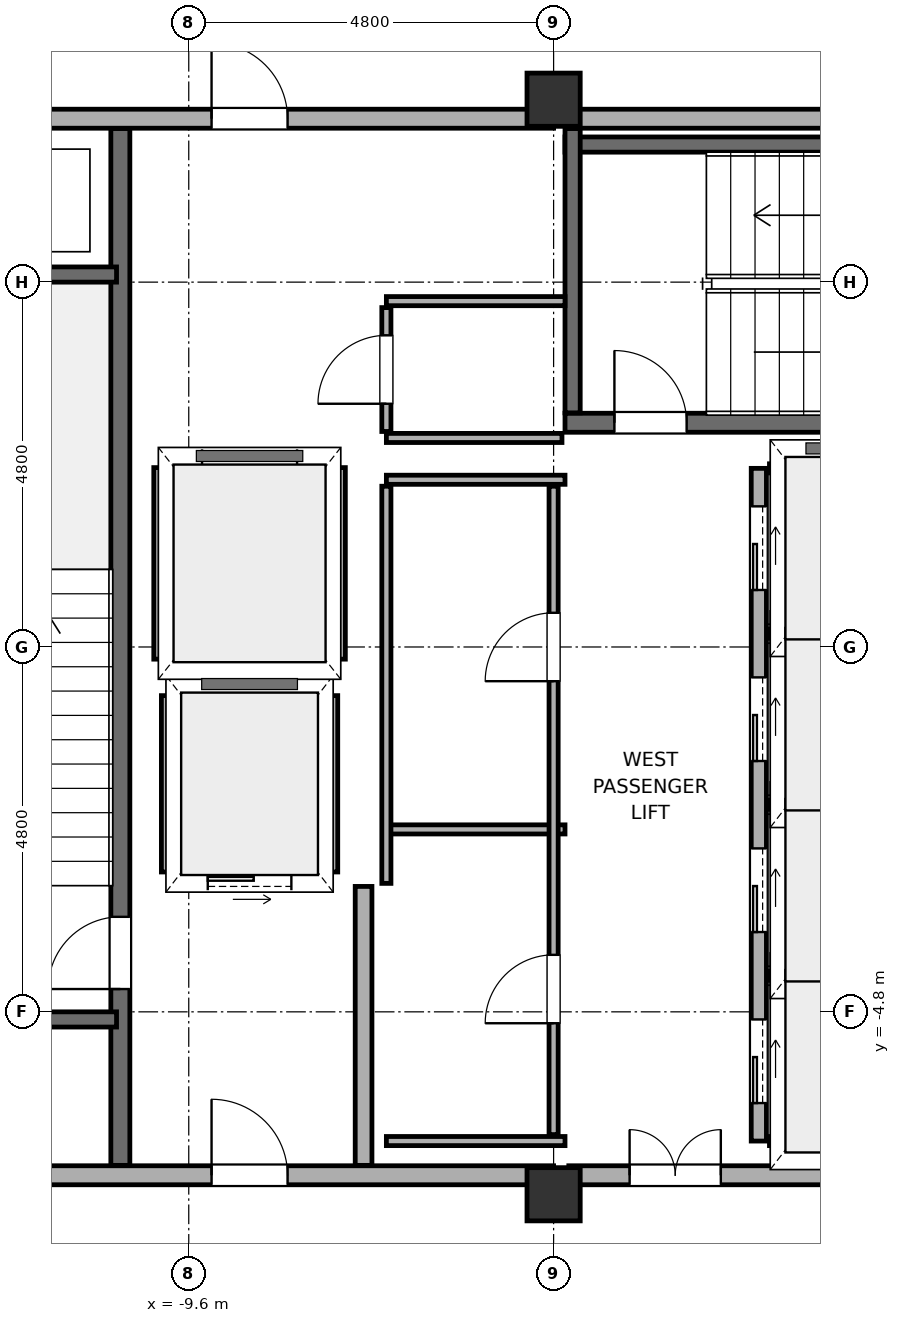
"""IFC4 building model, lengths in metres.
Left out: names, types, materials, properties, quantities, classifications, styles, units other than length and angle.
Written with IfcOpenShell. Run it as: python <this file> out.ifc"""

import sys

from ifc_helpers import new_model, si_unit, direction, frame, frame_2d, origin, origin_2d, place, context, subcontext, project, spatial, rectangle, hollow_rectangle, extrude, element, fill, save


model = new_model("IFC4")
c1 = context("Model", 3, precision=1e-05, world=origin(), true_north=direction((0.0, 1.0)))
c2 = subcontext(c1, "Body", "Model", "MODEL_VIEW")
j1 = project(units=[si_unit("LENGTHUNIT", "METRE"), si_unit("PLANEANGLEUNIT", "RADIAN")], contexts=[c1])
p1 = place(None, origin())
s1 = spatial("IfcSite", under=j1, at=p1, CompositionType="ELEMENT")
p2 = place(p1, origin())
s2 = spatial("IfcBuilding", under=s1, at=p2, CompositionType="ELEMENT")
p3 = place(p2, frame((0.0, 0.0, 180.3)))
s3 = spatial("IfcBuildingStorey", under=s2, at=p3, CompositionType="ELEMENT", Elevation=180.3)
for number, where, z_axis, x_axis in (
    (1, (-4.8, -7.2, 0.0), (0.0, 0.0, 1.0), (1.0, 0.0, 0.0)),
    (2, (-4.8, 7.2, 0.0), (0.0, 0.0, 1.0), (1.0, 0.0, 0.0)),
):
    element("IfcColumn", number, at=place(p3, frame(where, z_axis=z_axis, x_axis=x_axis)), inside=s3, PredefinedType="COLUMN", context=c2, shape_type="SweptSolid", body=[
        extrude(hollow_rectangle(XDim=0.7, YDim=0.7, WallThickness=0.032, at=origin_2d()), origin(), (0.0, 0.0, 1.0), 5.2),
    ])
p4 = place(p3, frame((-14.2, -6.95, 0.0), z_axis=(0.0, 0.0, 1.0), x_axis=(1.0, 0.0, 0.0)))
e3 = element("IfcWall", 3, at=p4, inside=s3, PredefinedType="SOLIDWALL", context=c2, shape_type="SweptSolid", body=[
    extrude(rectangle(XDim=9.4, YDim=0.25, at=frame_2d((4.7, 0.0))), origin(), (0.0, 0.0, 1.0), 3.55),
])
p5 = place(p4, frame((4.9, 0.0, 0.0)))
e4 = element("IfcOpeningElement", 4, at=p5, cuts=e3, PredefinedType="OPENING", context=c2, shape_type="SweptSolid", body=[
    extrude(rectangle(XDim=1.0, YDim=2.15, at=frame_2d((0.5, 1.075))), frame((0.0, 0.14, 0.0), z_axis=(0.0, -1.0, 0.0), x_axis=(1.0, 0.0, 0.0)), (0.0, 0.0, 1.0), 0.28),
])
p6 = place(p3, frame((-4.6, -6.95, 0.0), z_axis=(0.0, 0.0, 1.0), x_axis=(1.0, 0.0, 0.0)))
e5 = element("IfcWall", 5, at=p6, inside=s3, PredefinedType="SOLIDWALL", context=c2, shape_type="SweptSolid", body=[
    extrude(rectangle(XDim=9.2, YDim=0.25, at=frame_2d((4.6, 0.0))), origin(), (0.0, 0.0, 1.0), 3.75),
])
p7 = place(p6, frame((0.8, 0.0, 0.0)))
e6 = element("IfcOpeningElement", 6, at=p7, cuts=e5, PredefinedType="OPENING", context=c2, shape_type="SweptSolid", body=[
    extrude(rectangle(XDim=1.2, YDim=2.2, at=frame_2d((0.6, 1.1))), frame((0.0, 0.14, 0.0), z_axis=(0.0, -1.0, 0.0), x_axis=(1.0, 0.0, 0.0)), (0.0, 0.0, 1.0), 0.28),
])
p8 = place(p6, frame((5.55, 0.0, 0.0)))
e7 = element("IfcOpeningElement", 7, at=p8, cuts=e5, PredefinedType="OPENING", context=c2, shape_type="SweptSolid", body=[
    extrude(rectangle(XDim=1.2, YDim=2.2, at=frame_2d((0.6, 1.1))), frame((0.0, 0.14, 0.0), z_axis=(0.0, -1.0, 0.0), x_axis=(1.0, 0.0, 0.0)), (0.0, 0.0, 1.0), 0.28),
])
p9 = place(p3, frame((-14.2, 6.95, 0.0), z_axis=(0.0, 0.0, 1.0), x_axis=(1.0, 0.0, 0.0)))
e8 = element("IfcWall", 8, at=p9, inside=s3, PredefinedType="SOLIDWALL", context=c2, shape_type="SweptSolid", body=[
    extrude(rectangle(XDim=9.4, YDim=0.25, at=frame_2d((4.7, 0.0))), origin(), (0.0, 0.0, 1.0), 3.55),
])
p10 = place(p9, frame((4.9, 0.0, 0.0)))
e9 = element("IfcOpeningElement", 9, at=p10, cuts=e8, PredefinedType="OPENING", context=c2, shape_type="SweptSolid", body=[
    extrude(rectangle(XDim=1.0, YDim=2.15, at=frame_2d((0.5, 1.075))), frame((0.0, 0.14, 0.0), z_axis=(0.0, -1.0, 0.0), x_axis=(1.0, 0.0, 0.0)), (0.0, 0.0, 1.0), 0.28),
])
p11 = place(p3, frame((-4.6, 6.95, 0.0), z_axis=(0.0, 0.0, 1.0), x_axis=(1.0, 0.0, 0.0)))
e10 = element("IfcWall", 10, at=p11, inside=s3, PredefinedType="SOLIDWALL", context=c2, shape_type="SweptSolid", body=[
    extrude(rectangle(XDim=9.2, YDim=0.25, at=frame_2d((4.6, 0.0))), origin(), (0.0, 0.0, 1.0), 3.55),
])
p12 = place(p3, frame((-7.3, -6.82, 0.0), z_axis=(0.0, 0.0, 1.0), x_axis=(0.0, 1.0, 0.0)))
e11 = element("IfcWall", 11, at=p12, inside=s3, PredefinedType="SOLIDWALL", context=c2, shape_type="SweptSolid", body=[
    extrude(rectangle(XDim=3.67, YDim=0.22, at=frame_2d((1.835, 0.0))), origin(), (0.0, 0.0, 1.0), 3.55),
])
p13 = place(p3, frame((-10.5, -6.82, -0.22), z_axis=(0.0, 0.0, 1.0), x_axis=(0.0, 1.0, 0.0)))
e12 = element("IfcWall", 12, at=p13, inside=s3, PredefinedType="SOLIDWALL", context=c2, shape_type="SweptSolid", body=[
    extrude(rectangle(XDim=13.64, YDim=0.25, at=frame_2d((6.82, 0.0))), origin(), (0.0, 0.0, 1.0), 5.17),
])
p14 = place(p13, frame((2.32, 0.0, 0.22)))
e13 = element("IfcOpeningElement", 13, at=p14, cuts=e12, PredefinedType="OPENING", context=c2, shape_type="SweptSolid", body=[
    extrude(rectangle(XDim=0.95, YDim=2.15, at=frame_2d((0.475, 1.075))), frame((0.0, 0.14, 0.0), z_axis=(0.0, -1.0, 0.0), x_axis=(1.0, 0.0, 0.0)), (0.0, 0.0, 1.0), 0.28),
])
for number, where, z_axis, x_axis in (
    (14, (-14.2, -4.9, -0.22), (0.0, 0.0, 1.0), (1.0, 0.0, 0.0)),
    (15, (-14.2, 4.9, -0.22), (0.0, 0.0, 1.0), (1.0, 0.0, 0.0)),
):
    element("IfcWall", number, at=place(p3, frame(where, z_axis=z_axis, x_axis=x_axis)), inside=s3, PredefinedType="SOLIDWALL", context=c2, shape_type="SweptSolid", body=[
        extrude(rectangle(XDim=3.65, YDim=0.2, at=frame_2d((1.825, 0.0))), origin(), (0.0, 0.0, 1.0), 5.17),
    ])
p15 = place(p3, frame((-4.65, 2.95, -0.22), z_axis=(0.0, 0.0, 1.0), x_axis=(1.0, 0.0, 0.0)))
e16 = element("IfcWall", 16, at=p15, inside=s3, PredefinedType="SOLIDWALL", context=c2, shape_type="SweptSolid", body=[
    extrude(rectangle(XDim=9.9, YDim=0.25, at=frame_2d((4.95, 0.0))), origin(), (0.0, 0.0, 1.0), 5.17),
])
p16 = place(p15, frame((0.65, 0.0, 0.22)))
e17 = element("IfcOpeningElement", 17, at=p16, cuts=e16, PredefinedType="OPENING", context=c2, shape_type="SweptSolid", body=[
    extrude(rectangle(XDim=0.95, YDim=2.15, at=frame_2d((0.475, 1.075))), frame((0.0, 0.14, 0.0), z_axis=(0.0, -1.0, 0.0), x_axis=(1.0, 0.0, 0.0)), (0.0, 0.0, 1.0), 0.28),
])
p17 = place(p3, frame((-4.65, 6.61, -0.22), z_axis=(0.0, 0.0, 1.0), x_axis=(1.0, 0.0, 0.0)))
e18 = element("IfcWall", 18, at=p17, inside=s3, PredefinedType="SOLIDWALL", context=c2, shape_type="SweptSolid", body=[
    extrude(rectangle(XDim=9.9, YDim=0.2, at=frame_2d((4.95, 0.0))), origin(), (0.0, 0.0, 1.0), 5.17),
])
p18 = place(p3, frame((-4.55, 3.08, -0.22), z_axis=(0.0, 0.0, 1.0), x_axis=(0.0, 1.0, 0.0)))
e19 = element("IfcWall", 19, at=p18, inside=s3, PredefinedType="SOLIDWALL", context=c2, shape_type="SweptSolid", body=[
    extrude(rectangle(XDim=3.74, YDim=0.2, at=frame_2d((1.87, 0.0))), origin(), (0.0, 0.0, 1.0), 5.17),
])
p19 = place(p3, frame((-2.1, -6.5, 0.0), z_axis=(0.0, 0.0, 1.0), x_axis=(0.0, 1.0, 0.0)))
e20 = element("IfcWall", 20, at=p19, inside=s3, PredefinedType="SOLIDWALL", context=c2, shape_type="SweptSolid", body=[
    extrude(rectangle(XDim=8.85, YDim=0.2, at=frame_2d((4.425, 0.0))), origin(), (0.0, 0.0, 1.0), 4.95),
])
p20 = place(p19, frame((0.5, 0.0, 0.0)))
e21 = element("IfcOpeningElement", 21, at=p20, cuts=e20, PredefinedType="OPENING", context=c2, shape_type="SweptSolid", body=[
    extrude(rectangle(XDim=1.1, YDim=2.2, at=frame_2d((0.55, 1.1))), frame((0.0, 0.115, 0.0), z_axis=(0.0, -1.0, 0.0), x_axis=(1.0, 0.0, 0.0)), (0.0, 0.0, 1.0), 0.23),
])
p21 = place(p19, frame((2.75, 0.0, 0.0)))
e22 = element("IfcOpeningElement", 22, at=p21, cuts=e20, PredefinedType="OPENING", context=c2, shape_type="SweptSolid", body=[
    extrude(rectangle(XDim=1.1, YDim=2.2, at=frame_2d((0.55, 1.1))), frame((0.0, 0.115, 0.0), z_axis=(0.0, -1.0, 0.0), x_axis=(1.0, 0.0, 0.0)), (0.0, 0.0, 1.0), 0.23),
])
p22 = place(p19, frame((5.0, 0.0, 0.0)))
e23 = element("IfcOpeningElement", 23, at=p22, cuts=e20, PredefinedType="OPENING", context=c2, shape_type="SweptSolid", body=[
    extrude(rectangle(XDim=1.1, YDim=2.2, at=frame_2d((0.55, 1.1))), frame((0.0, 0.115, 0.0), z_axis=(0.0, -1.0, 0.0), x_axis=(1.0, 0.0, 0.0)), (0.0, 0.0, 1.0), 0.23),
])
p23 = place(p19, frame((7.25, 0.0, 0.0)))
e24 = element("IfcOpeningElement", 24, at=p23, cuts=e20, PredefinedType="OPENING", context=c2, shape_type="SweptSolid", body=[
    extrude(rectangle(XDim=1.1, YDim=2.2, at=frame_2d((0.55, 1.1))), frame((0.0, 0.115, 0.0), z_axis=(0.0, -1.0, 0.0), x_axis=(1.0, 0.0, 0.0)), (0.0, 0.0, 1.0), 0.23),
])
for number, where, z_axis, x_axis in (
    (25, (-1.96, -6.5, 0.0), (0.0, 0.0, 1.0), (1.0, 0.0, 0.0)),
    (26, (-1.96, -4.325, 0.0), (0.0, 0.0, 1.0), (1.0, 0.0, 0.0)),
    (27, (-1.96, -2.075, 0.0), (0.0, 0.0, 1.0), (1.0, 0.0, 0.0)),
    (28, (-1.96, 0.175, 0.0), (0.0, 0.0, 1.0), (1.0, 0.0, 0.0)),
    (29, (-1.96, 2.35, 0.0), (0.0, 0.0, 1.0), (1.0, 0.0, 0.0)),
):
    element("IfcWall", number, at=place(p3, frame(where, z_axis=z_axis, x_axis=x_axis)), inside=s3, PredefinedType="PARTITIONING", context=c2, shape_type="SweptSolid", body=[
        extrude(rectangle(XDim=2.22, YDim=0.12, at=frame_2d((1.11, 0.0))), origin(), (0.0, 0.0, 1.0), 4.95),
    ])
p24 = place(p3, frame((-9.82, -3.1, 0.0), z_axis=(0.0, 0.0, 1.0), x_axis=(1.0, 0.0, 0.0)))
e30 = element("IfcWall", 30, at=p24, inside=s3, PredefinedType="SOLIDWALL", context=c2, shape_type="SweptSolid", body=[
    extrude(rectangle(XDim=2.04, YDim=0.2, at=frame_2d((1.02, 0.0))), origin(), (0.0, 0.0, 1.0), 4.95),
])
p25 = place(p24, frame((0.47, 0.0, 0.0)))
e31 = element("IfcOpeningElement", 31, at=p25, cuts=e30, PredefinedType="OPENING", context=c2, shape_type="SweptSolid", body=[
    extrude(rectangle(XDim=1.1, YDim=2.2, at=frame_2d((0.55, 1.1))), frame((0.0, 0.115, 0.0), z_axis=(0.0, -1.0, 0.0), x_axis=(1.0, 0.0, 0.0)), (0.0, 0.0, 1.0), 0.23),
])
p26 = place(p3, frame((-9.82, -0.5, 0.0), z_axis=(0.0, 0.0, 1.0), x_axis=(1.0, 0.0, 0.0)))
e32 = element("IfcWall", 32, at=p26, inside=s3, PredefinedType="SOLIDWALL", context=c2, shape_type="SweptSolid", body=[
    extrude(rectangle(XDim=2.04, YDim=0.2, at=frame_2d((1.02, 0.0))), origin(), (0.0, 0.0, 1.0), 4.95),
])
for number, where, z_axis, x_axis in (
    (33, (-9.9, -2.96, 0.0), (0.0, 0.0, 1.0), (0.0, 1.0, 0.0)),
    (34, (-7.7, -2.96, 0.0), (0.0, 0.0, 1.0), (0.0, 1.0, 0.0)),
):
    element("IfcWall", number, at=place(p3, frame(where, z_axis=z_axis, x_axis=x_axis)), inside=s3, PredefinedType="PARTITIONING", context=c2, shape_type="SweptSolid", body=[
        extrude(rectangle(XDim=2.32, YDim=0.12, at=frame_2d((1.16, 0.0))), origin(), (0.0, 0.0, 1.0), 4.95),
    ])
p27 = place(p3, frame((-9.92, 2.5, 0.0), z_axis=(0.0, 0.0, 1.0), x_axis=(1.0, 0.0, 0.0)))
e35 = element("IfcWall", 35, at=p27, inside=s3, PredefinedType="SOLIDWALL", context=c2, shape_type="SweptSolid", body=[
    extrude(rectangle(XDim=2.24, YDim=0.2, at=frame_2d((1.12, 0.0))), origin(), (0.0, 0.0, 1.0), 4.95),
])
p28 = place(p27, frame((0.495, 0.0, 0.0)))
e36 = element("IfcOpeningElement", 36, at=p28, cuts=e35, PredefinedType="OPENING", context=c2, shape_type="SweptSolid", body=[
    extrude(rectangle(XDim=1.25, YDim=2.25, at=frame_2d((0.625, 1.125))), frame((0.0, 0.115, 0.0), z_axis=(0.0, -1.0, 0.0), x_axis=(1.0, 0.0, 0.0)), (0.0, 0.0, 1.0), 0.23),
])
p29 = place(p3, frame((-9.92, -0.3, 0.0), z_axis=(0.0, 0.0, 1.0), x_axis=(1.0, 0.0, 0.0)))
e37 = element("IfcWall", 37, at=p29, inside=s3, PredefinedType="SOLIDWALL", context=c2, shape_type="SweptSolid", body=[
    extrude(rectangle(XDim=2.24, YDim=0.2, at=frame_2d((1.12, 0.0))), origin(), (0.0, 0.0, 1.0), 4.95),
])
for number, where, z_axis, x_axis in (
    (38, (-10.0, -0.16, 0.0), (0.0, 0.0, 1.0), (0.0, 1.0, 0.0)),
    (39, (-7.6, -0.16, 0.0), (0.0, 0.0, 1.0), (0.0, 1.0, 0.0)),
):
    element("IfcWall", number, at=place(p3, frame(where, z_axis=z_axis, x_axis=x_axis)), inside=s3, PredefinedType="PARTITIONING", context=c2, shape_type="SweptSolid", body=[
        extrude(rectangle(XDim=2.52, YDim=0.12, at=frame_2d((1.26, 0.0))), origin(), (0.0, 0.0, 1.0), 4.95),
    ])
for number, where, z_axis, x_axis in (
    (40, (-7.0, -6.5, 0.0), (0.0, 0.0, 1.0), (1.0, 0.0, 0.0)),
    (41, (-7.0, -2.4, 0.0), (0.0, 0.0, 1.0), (1.0, 0.0, 0.0)),
    (42, (-7.0, 2.2, 0.0), (0.0, 0.0, 1.0), (1.0, 0.0, 0.0)),
):
    element("IfcWall", number, at=place(p3, frame(where, z_axis=z_axis, x_axis=x_axis)), inside=s3, PredefinedType="PARTITIONING", context=c2, shape_type="SweptSolid", body=[
        extrude(rectangle(XDim=2.35, YDim=0.12, at=frame_2d((1.175, 0.0))), origin(), (0.0, 0.0, 1.0), 4.95),
    ])
p30 = place(p3, frame((-7.0, 2.75, 0.0), z_axis=(0.0, 0.0, 1.0), x_axis=(1.0, 0.0, 0.0)))
e43 = element("IfcWall", 43, at=p30, inside=s3, PredefinedType="PARTITIONING", context=c2, shape_type="SweptSolid", body=[
    extrude(rectangle(XDim=2.31, YDim=0.12, at=frame_2d((1.155, 0.0))), origin(), (0.0, 0.0, 1.0), 4.95),
])
p31 = place(p3, frame((-7.0, 4.55, 0.0), z_axis=(0.0, 0.0, 1.0), x_axis=(1.0, 0.0, 0.0)))
e44 = element("IfcWall", 44, at=p31, inside=s3, PredefinedType="PARTITIONING", context=c2, shape_type="SweptSolid", body=[
    extrude(rectangle(XDim=2.35, YDim=0.12, at=frame_2d((1.175, 0.0))), origin(), (0.0, 0.0, 1.0), 4.95),
])
p32 = place(p3, frame((-7.0, -3.11, 0.0), z_axis=(0.0, 0.0, 1.0), x_axis=(0.0, 1.0, 0.0)))
e45 = element("IfcWall", 45, at=p32, inside=s3, PredefinedType="PARTITIONING", context=c2, shape_type="SweptSolid", body=[
    extrude(rectangle(XDim=5.225, YDim=0.12, at=frame_2d((2.613, 0.0))), origin(), (0.0, 0.0, 1.0), 4.95),
])
p33 = place(p3, frame((-7.0, 2.835, 0.0), z_axis=(0.0, 0.0, 1.0), x_axis=(0.0, 1.0, 0.0)))
e46 = element("IfcWall", 46, at=p33, inside=s3, PredefinedType="PARTITIONING", context=c2, shape_type="SweptSolid", body=[
    extrude(rectangle(XDim=1.63, YDim=0.12, at=frame_2d((0.815, 0.0))), origin(), (0.0, 0.0, 1.0), 4.95),
])
p34 = place(p33, frame((0.365, 0.0, 0.0)))
e47 = element("IfcOpeningElement", 47, at=p34, cuts=e46, PredefinedType="OPENING", context=c2, shape_type="SweptSolid", body=[
    extrude(rectangle(XDim=0.9, YDim=2.1, at=frame_2d((0.45, 1.05))), frame((0.0, 0.075, 0.0), z_axis=(0.0, -1.0, 0.0), x_axis=(1.0, 0.0, 0.0)), (0.0, 0.0, 1.0), 0.15),
])
p35 = place(p3, frame((-4.8, -6.415, 0.0), z_axis=(0.0, 0.0, 1.0), x_axis=(0.0, 1.0, 0.0)))
e48 = element("IfcWall", 48, at=p35, inside=s3, PredefinedType="PARTITIONING", context=c2, shape_type="SweptSolid", body=[
    extrude(rectangle(XDim=8.53, YDim=0.12, at=frame_2d((4.265, 0.0))), origin(), (0.0, 0.0, 1.0), 4.95),
])
p36 = place(p35, frame((1.465, 0.0, 0.0)))
e49 = element("IfcOpeningElement", 49, at=p36, cuts=e48, PredefinedType="OPENING", context=c2, shape_type="SweptSolid", body=[
    extrude(rectangle(XDim=0.9, YDim=2.1, at=frame_2d((0.45, 1.05))), frame((0.0, 0.075, 0.0), z_axis=(0.0, -1.0, 0.0), x_axis=(1.0, 0.0, 0.0)), (0.0, 0.0, 1.0), 0.15),
])
p37 = place(p35, frame((5.965, 0.0, 0.0)))
e50 = element("IfcOpeningElement", 50, at=p37, cuts=e48, PredefinedType="OPENING", context=c2, shape_type="SweptSolid", body=[
    extrude(rectangle(XDim=0.9, YDim=2.1, at=frame_2d((0.45, 1.05))), frame((0.0, 0.075, 0.0), z_axis=(0.0, -1.0, 0.0), x_axis=(1.0, 0.0, 0.0)), (0.0, 0.0, 1.0), 0.15),
])
p38 = place(p5, origin())
e51 = element("IfcDoor", 51, at=p38, inside=s3, OperationType="SINGLE_SWING_LEFT", PredefinedType="DOOR", context=c2, shape_type="SweptSolid", body=[
    extrude(rectangle(XDim=1.0, YDim=2.15, at=frame_2d((0.5, 1.075))), frame((0.0, 0.025, 0.0), z_axis=(0.0, -1.0, 0.0), x_axis=(1.0, 0.0, 0.0)), (0.0, 0.0, 1.0), 0.05),
])
fill(e4, e51)
p39 = place(p7, origin())
e52 = element("IfcDoor", 52, at=p39, inside=s3, OperationType="DOUBLE_DOOR_SINGLE_SWING", PredefinedType="DOOR", context=c2, shape_type="SweptSolid", body=[
    extrude(rectangle(XDim=1.2, YDim=2.2, at=frame_2d((0.6, 1.1))), frame((0.0, 0.025, 0.0), z_axis=(0.0, -1.0, 0.0), x_axis=(1.0, 0.0, 0.0)), (0.0, 0.0, 1.0), 0.05),
])
fill(e6, e52)
p40 = place(p10, origin())
e53 = element("IfcDoor", 53, at=p40, inside=s3, OperationType="SINGLE_SWING_RIGHT", PredefinedType="DOOR", context=c2, shape_type="SweptSolid", body=[
    extrude(rectangle(XDim=1.0, YDim=2.15, at=frame_2d((0.5, 1.075))), frame((0.0, 0.025, 0.0), z_axis=(0.0, -1.0, 0.0), x_axis=(1.0, 0.0, 0.0)), (0.0, 0.0, 1.0), 0.05),
])
fill(e9, e53)
p41 = place(p14, origin())
e54 = element("IfcDoor", 54, at=p41, inside=s3, OperationType="SINGLE_SWING_RIGHT", PredefinedType="DOOR", context=c2, shape_type="SweptSolid", body=[
    extrude(rectangle(XDim=0.95, YDim=2.15, at=frame_2d((0.475, 1.075))), frame((0.0, 0.025, 0.0), z_axis=(0.0, -1.0, 0.0), x_axis=(1.0, 0.0, 0.0)), (0.0, 0.0, 1.0), 0.05),
])
fill(e13, e54)
p42 = place(p16, origin())
e55 = element("IfcDoor", 55, at=p42, inside=s3, OperationType="SINGLE_SWING_RIGHT", PredefinedType="DOOR", context=c2, shape_type="SweptSolid", body=[
    extrude(rectangle(XDim=0.95, YDim=2.15, at=frame_2d((0.475, 1.075))), frame((0.0, 0.025, 0.0), z_axis=(0.0, -1.0, 0.0), x_axis=(1.0, 0.0, 0.0)), (0.0, 0.0, 1.0), 0.05),
])
fill(e17, e55)
p43 = place(p20, origin())
e56 = element("IfcDoor", 56, at=p43, inside=s3, OperationType="SLIDING_TO_LEFT", PredefinedType="DOOR", context=c2, shape_type="SweptSolid", body=[
    extrude(rectangle(XDim=1.1, YDim=2.2, at=frame_2d((0.55, 1.1))), frame((0.0, 0.025, 0.0), z_axis=(0.0, -1.0, 0.0), x_axis=(1.0, 0.0, 0.0)), (0.0, 0.0, 1.0), 0.05),
])
fill(e21, e56)
p44 = place(p21, origin())
e57 = element("IfcDoor", 57, at=p44, inside=s3, OperationType="SLIDING_TO_LEFT", PredefinedType="DOOR", context=c2, shape_type="SweptSolid", body=[
    extrude(rectangle(XDim=1.1, YDim=2.2, at=frame_2d((0.55, 1.1))), frame((0.0, 0.025, 0.0), z_axis=(0.0, -1.0, 0.0), x_axis=(1.0, 0.0, 0.0)), (0.0, 0.0, 1.0), 0.05),
])
fill(e22, e57)
p45 = place(p22, origin())
e58 = element("IfcDoor", 58, at=p45, inside=s3, OperationType="SLIDING_TO_LEFT", PredefinedType="DOOR", context=c2, shape_type="SweptSolid", body=[
    extrude(rectangle(XDim=1.1, YDim=2.2, at=frame_2d((0.55, 1.1))), frame((0.0, 0.025, 0.0), z_axis=(0.0, -1.0, 0.0), x_axis=(1.0, 0.0, 0.0)), (0.0, 0.0, 1.0), 0.05),
])
fill(e23, e58)
p46 = place(p23, origin())
e59 = element("IfcDoor", 59, at=p46, inside=s3, OperationType="SLIDING_TO_LEFT", PredefinedType="DOOR", context=c2, shape_type="SweptSolid", body=[
    extrude(rectangle(XDim=1.1, YDim=2.2, at=frame_2d((0.55, 1.1))), frame((0.0, 0.025, 0.0), z_axis=(0.0, -1.0, 0.0), x_axis=(1.0, 0.0, 0.0)), (0.0, 0.0, 1.0), 0.05),
])
fill(e24, e59)
p47 = place(p25, origin())
e60 = element("IfcDoor", 60, at=p47, inside=s3, OperationType="SLIDING_TO_LEFT", PredefinedType="DOOR", context=c2, shape_type="SweptSolid", body=[
    extrude(rectangle(XDim=1.1, YDim=2.2, at=frame_2d((0.55, 1.1))), frame((0.0, 0.025, 0.0), z_axis=(0.0, -1.0, 0.0), x_axis=(1.0, 0.0, 0.0)), (0.0, 0.0, 1.0), 0.05),
])
fill(e31, e60)
p48 = place(p28, origin())
e61 = element("IfcDoor", 61, at=p48, inside=s3, OperationType="SLIDING_TO_LEFT", PredefinedType="DOOR", context=c2, shape_type="SweptSolid", body=[
    extrude(rectangle(XDim=1.25, YDim=2.25, at=frame_2d((0.625, 1.125))), frame((0.0, 0.025, 0.0), z_axis=(0.0, -1.0, 0.0), x_axis=(1.0, 0.0, 0.0)), (0.0, 0.0, 1.0), 0.05),
])
fill(e36, e61)
p49 = place(p36, origin())
e62 = element("IfcDoor", 62, at=p49, inside=s3, OperationType="SINGLE_SWING_LEFT", PredefinedType="DOOR", context=c2, shape_type="SweptSolid", body=[
    extrude(rectangle(XDim=0.9, YDim=2.1, at=frame_2d((0.45, 1.05))), frame((0.0, 0.025, 0.0), z_axis=(0.0, -1.0, 0.0), x_axis=(1.0, 0.0, 0.0)), (0.0, 0.0, 1.0), 0.05),
])
fill(e49, e62)
p50 = place(p37, origin())
e63 = element("IfcDoor", 63, at=p50, inside=s3, OperationType="SINGLE_SWING_RIGHT", PredefinedType="DOOR", context=c2, shape_type="SweptSolid", body=[
    extrude(rectangle(XDim=0.9, YDim=2.1, at=frame_2d((0.45, 1.05))), frame((0.0, 0.025, 0.0), z_axis=(0.0, -1.0, 0.0), x_axis=(1.0, 0.0, 0.0)), (0.0, 0.0, 1.0), 0.05),
])
fill(e50, e63)
p51 = place(p34, origin())
e64 = element("IfcDoor", 64, at=p51, inside=s3, OperationType="SINGLE_SWING_RIGHT", PredefinedType="DOOR", context=c2, shape_type="SweptSolid", body=[
    extrude(rectangle(XDim=0.9, YDim=2.1, at=frame_2d((0.45, 1.05))), frame((0.0, 0.025, 0.0), z_axis=(0.0, -1.0, 0.0), x_axis=(1.0, 0.0, 0.0)), (0.0, 0.0, 1.0), 0.05),
])
fill(e47, e64)
save(model, sys.argv[1])
